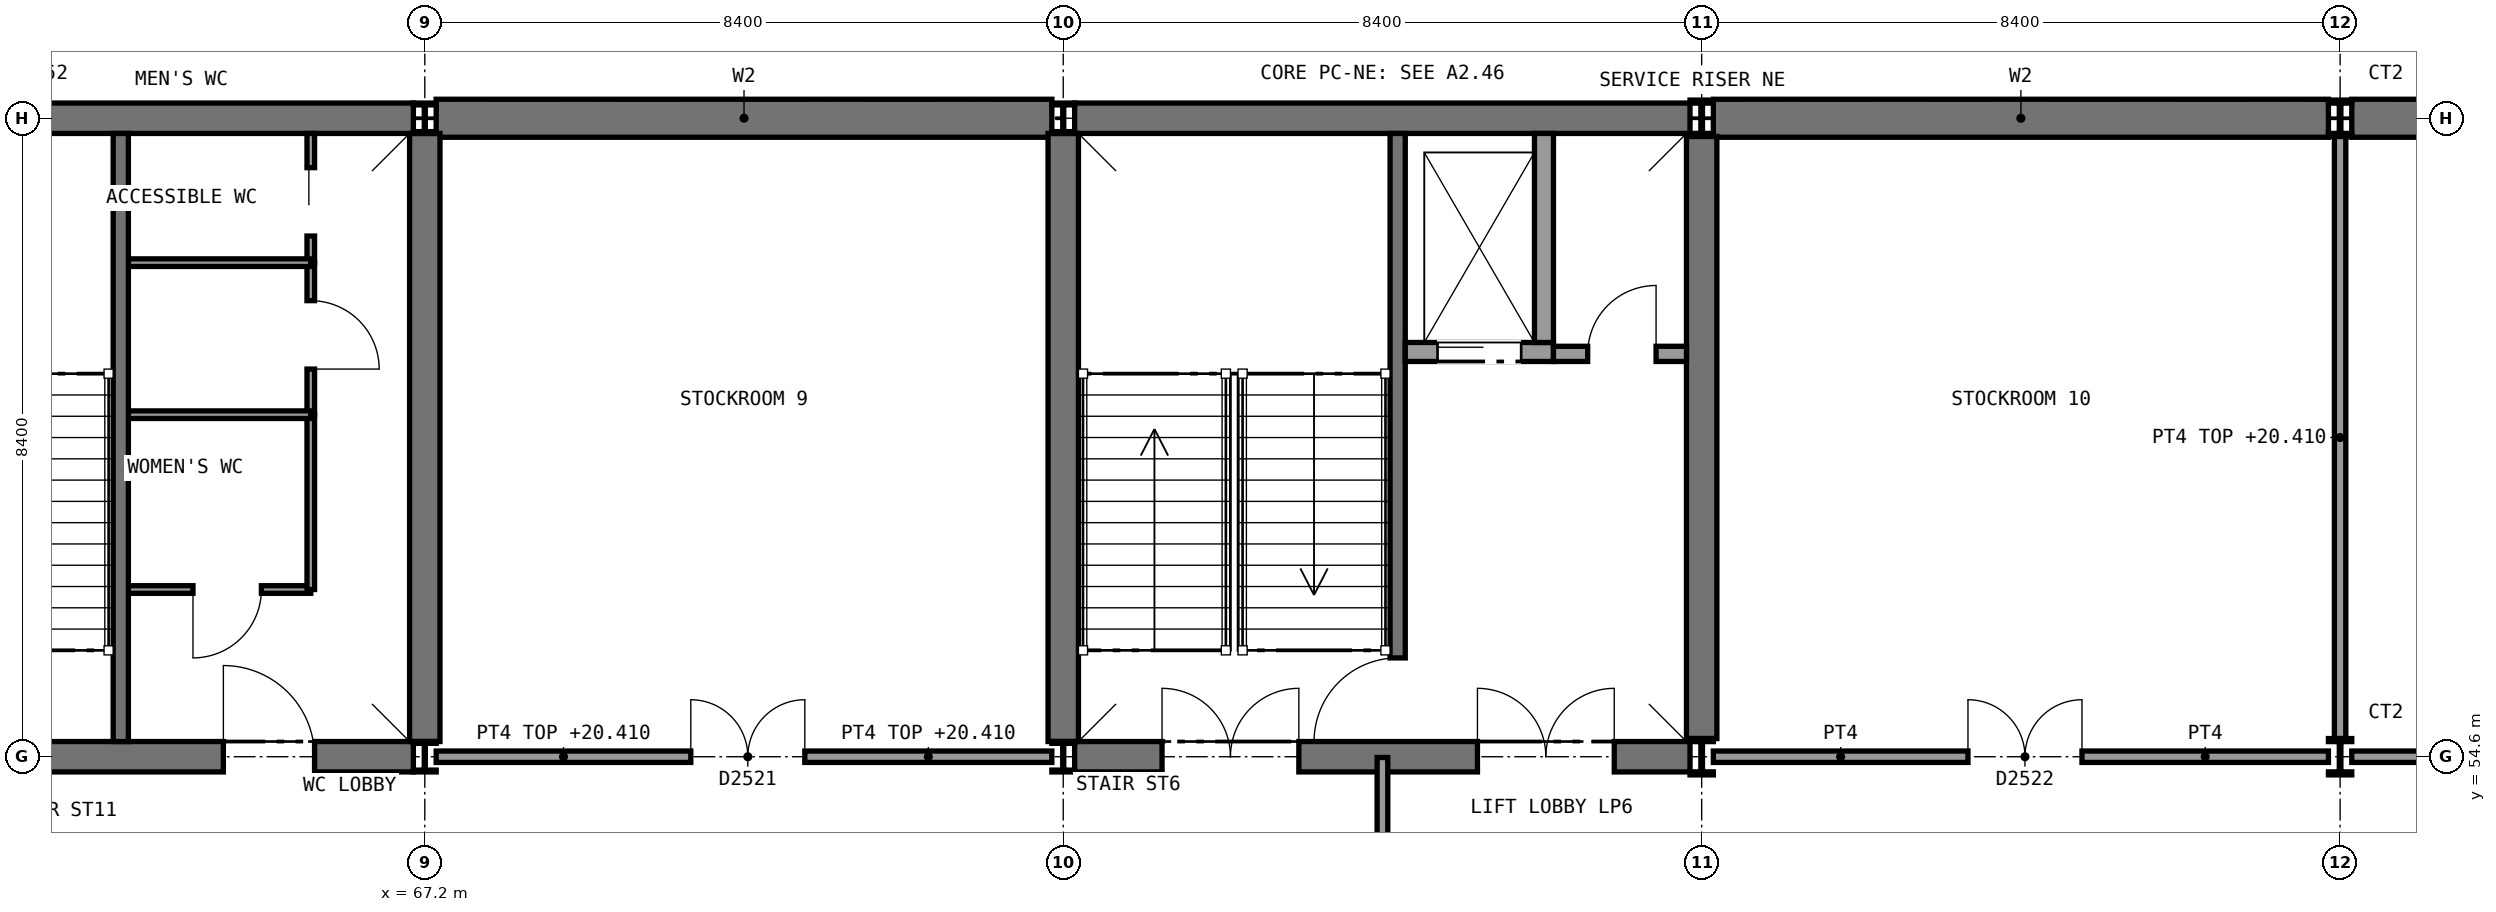
"""IFC4 building model, lengths in metres.
Left out: names, types, materials, properties, quantities, classifications, styles, units other than length and angle.
Written with IfcOpenShell. Run it as: python <this file> out.ifc"""

import sys

from ifc_helpers import new_model, si_unit, direction, frame, frame_2d, origin, origin_2d, place, context, subcontext, project, spatial, rectangle, i_section, extrude, element, fill, save


model = new_model("IFC4")
c1 = context("Model", 3, precision=1e-05, world=origin(), true_north=direction((0.0, 1.0)))
c2 = subcontext(c1, "Body", "Model", "MODEL_VIEW")
j1 = project(units=[si_unit("LENGTHUNIT", "METRE"), si_unit("PLANEANGLEUNIT", "RADIAN")], contexts=[c1])
p1 = place(None, origin())
s1 = spatial("IfcSite", under=j1, at=p1, CompositionType="ELEMENT")
p2 = place(p1, origin())
s2 = spatial("IfcBuilding", under=s1, at=p2, CompositionType="ELEMENT")
p3 = place(p2, frame((0.0, 0.0, 16.2)))
s3 = spatial("IfcBuildingStorey", under=s2, at=p3, CompositionType="ELEMENT", Elevation=16.2)
p4 = place(p3, frame((67.35, 63.0, 0.0), z_axis=(0.0, 0.0, 1.0), x_axis=(1.0, 0.0, 0.0)))
e1 = element("IfcWall", 1, at=p4, inside=s3, PredefinedType="SHEAR", context=c2, shape_type="SweptSolid", body=[
    extrude(rectangle(XDim=8.1, YDim=0.5, at=frame_2d((4.05, 0.0))), origin(), (0.0, 0.0, 1.0), 4.65),
])
p5 = place(p3, frame((84.154, 63.0, 0.0), z_axis=(0.0, 0.0, 1.0), x_axis=(1.0, 0.0, 0.0)))
e2 = element("IfcWall", 2, at=p5, inside=s3, PredefinedType="SHEAR", context=c2, shape_type="SweptSolid", body=[
    extrude(rectangle(XDim=8.093, YDim=0.5, at=frame_2d((4.046, 0.0))), origin(), (0.0, 0.0, 1.0), 4.65),
])
p6 = place(p3, frame((92.553, 63.0, 0.0), z_axis=(0.0, 0.0, 1.0), x_axis=(1.0, 0.0, 0.0)))
e3 = element("IfcWall", 3, at=p6, inside=s3, PredefinedType="SHEAR", context=c2, shape_type="SweptSolid", body=[
    extrude(rectangle(XDim=8.093, YDim=0.5, at=frame_2d((4.046, 0.0))), origin(), (0.0, 0.0, 1.0), 4.65),
])
p7 = place(p3, frame((75.75, 63.0, 0.0), z_axis=(0.0, 0.0, 1.0), x_axis=(1.0, 0.0, 0.0)))
e4 = element("IfcWall", 4, at=p7, inside=s3, PredefinedType="SHEAR", context=c2, shape_type="SweptSolid", body=[
    extrude(rectangle(XDim=8.096, YDim=0.4, at=frame_2d((4.048, 0.0))), origin(), (0.0, 0.0, 1.0), 4.65),
])
p8 = place(p3, frame((75.75, 54.6, 0.0), z_axis=(0.0, 0.0, 1.0), x_axis=(1.0, 0.0, 0.0)))
e5 = element("IfcWall", 5, at=p8, inside=s3, PredefinedType="SHEAR", context=c2, shape_type="SweptSolid", body=[
    extrude(rectangle(XDim=8.096, YDim=0.4, at=frame_2d((4.048, 0.0))), origin(), (0.0, 0.0, 1.0), 4.65),
])
p9 = place(p8, frame((1.15, 0.0, 0.0)))
e6 = element("IfcOpeningElement", 6, at=p9, cuts=e5, PredefinedType="OPENING", context=c2, shape_type="SweptSolid", body=[
    extrude(rectangle(XDim=1.8, YDim=2.1, at=frame_2d((0.9, 1.05))), frame((0.0, 0.21, 0.0), z_axis=(0.0, -1.0, 0.0), x_axis=(1.0, 0.0, 0.0)), (0.0, 0.0, 1.0), 0.42),
])
p10 = place(p8, frame((5.3, 0.0, 0.0)))
e7 = element("IfcOpeningElement", 7, at=p10, cuts=e5, PredefinedType="OPENING", context=c2, shape_type="SweptSolid", body=[
    extrude(rectangle(XDim=1.8, YDim=2.1, at=frame_2d((0.9, 1.05))), frame((0.0, 0.21, 0.0), z_axis=(0.0, -1.0, 0.0), x_axis=(1.0, 0.0, 0.0)), (0.0, 0.0, 1.0), 0.42),
])
p11 = place(p3, frame((75.6, 54.8, 0.0), z_axis=(0.0, 0.0, 1.0), x_axis=(0.0, 1.0, 0.0)))
e8 = element("IfcWall", 8, at=p11, inside=s3, PredefinedType="SHEAR", context=c2, shape_type="SweptSolid", body=[
    extrude(rectangle(XDim=8.0, YDim=0.4, at=frame_2d((4.0, 0.0))), origin(), (0.0, 0.0, 1.0), 4.65),
])
p12 = place(p3, frame((84.0, 54.839, 0.0), z_axis=(0.0, 0.0, 1.0), x_axis=(0.0, 1.0, 0.0)))
e9 = element("IfcWall", 9, at=p12, inside=s3, PredefinedType="SHEAR", context=c2, shape_type="SweptSolid", body=[
    extrude(rectangle(XDim=7.922, YDim=0.4, at=frame_2d((3.961, 0.0))), origin(), (0.0, 0.0, 1.0), 4.65),
])
p13 = place(p3, frame((58.95, 63.0, 0.0), z_axis=(0.0, 0.0, 1.0), x_axis=(1.0, 0.0, 0.0)))
e10 = element("IfcWall", 10, at=p13, inside=s3, PredefinedType="SHEAR", context=c2, shape_type="SweptSolid", body=[
    extrude(rectangle(XDim=8.1, YDim=0.4, at=frame_2d((4.05, 0.0))), origin(), (0.0, 0.0, 1.0), 4.65),
])
p14 = place(p3, frame((58.95, 54.6, 0.0), z_axis=(0.0, 0.0, 1.0), x_axis=(1.0, 0.0, 0.0)))
e11 = element("IfcWall", 11, at=p14, inside=s3, PredefinedType="SHEAR", context=c2, shape_type="SweptSolid", body=[
    extrude(rectangle(XDim=8.1, YDim=0.4, at=frame_2d((4.05, 0.0))), origin(), (0.0, 0.0, 1.0), 4.65),
])
p15 = place(p14, frame((1.15, 0.0, 0.0)))
e12 = element("IfcOpeningElement", 12, at=p15, cuts=e11, PredefinedType="OPENING", context=c2, shape_type="SweptSolid", body=[
    extrude(rectangle(XDim=1.8, YDim=2.1, at=frame_2d((0.9, 1.05))), frame((0.0, 0.21, 0.0), z_axis=(0.0, -1.0, 0.0), x_axis=(1.0, 0.0, 0.0)), (0.0, 0.0, 1.0), 0.42),
])
p16 = place(p14, frame((5.6, 0.0, 0.0)))
e13 = element("IfcOpeningElement", 13, at=p16, cuts=e11, PredefinedType="OPENING", context=c2, shape_type="SweptSolid", body=[
    extrude(rectangle(XDim=1.2, YDim=2.1, at=frame_2d((0.6, 1.05))), frame((0.0, 0.21, 0.0), z_axis=(0.0, -1.0, 0.0), x_axis=(1.0, 0.0, 0.0)), (0.0, 0.0, 1.0), 0.42),
])
p17 = place(p3, frame((67.2, 54.8, 0.0), z_axis=(0.0, 0.0, 1.0), x_axis=(0.0, 1.0, 0.0)))
e14 = element("IfcWall", 14, at=p17, inside=s3, PredefinedType="SHEAR", context=c2, shape_type="SweptSolid", body=[
    extrude(rectangle(XDim=8.0, YDim=0.4, at=frame_2d((4.0, 0.0))), origin(), (0.0, 0.0, 1.0), 4.65),
])
for number, where, z_axis, x_axis in (
    (15, (67.2, 54.6, 0.0), (0.0, 0.0, 1.0), (1.0, 0.0, 0.0)),
    (16, (67.2, 63.0, 0.0), (0.0, 0.0, 1.0), (1.0, 0.0, 0.0)),
    (17, (75.6, 54.6, 0.0), (0.0, 0.0, 1.0), (1.0, 0.0, 0.0)),
    (18, (75.6, 63.0, 0.0), (0.0, 0.0, 1.0), (1.0, 0.0, 0.0)),
):
    element("IfcColumn", number, at=place(p3, frame(where, z_axis=z_axis, x_axis=x_axis)), inside=s3, PredefinedType="COLUMN", context=c2, shape_type="SweptSolid", body=[
        extrude(i_section(OverallWidth=0.3, OverallDepth=0.4, WebThickness=0.013, FlangeThickness=0.024, FilletRadius=0.027, at=origin_2d()), origin(), (0.0, 0.0, 1.0), 4.8),
    ])
for number, where, z_axis, x_axis in (
    (19, (84.0, 54.6, 0.0), (0.0, 0.0, 1.0), (1.0, 0.0, 0.0)),
    (20, (84.0, 63.0, 0.0), (0.0, 0.0, 1.0), (1.0, 0.0, 0.0)),
    (21, (92.4, 54.6, 0.0), (0.0, 0.0, 1.0), (1.0, 0.0, 0.0)),
    (22, (92.4, 63.0, 0.0), (0.0, 0.0, 1.0), (1.0, 0.0, 0.0)),
):
    element("IfcColumn", number, at=place(p3, frame(where, z_axis=z_axis, x_axis=x_axis)), inside=s3, PredefinedType="COLUMN", context=c2, shape_type="SweptSolid", body=[
        extrude(i_section(OverallWidth=0.307, OverallDepth=0.478, WebThickness=0.021, FlangeThickness=0.04, FilletRadius=0.027, at=origin_2d()), origin(), (0.0, 0.0, 1.0), 4.8),
    ])
p18 = place(p3, frame((63.3, 56.8, 0.0), z_axis=(0.0, 0.0, 1.0), x_axis=(1.0, 0.0, 0.0)))
e23 = element("IfcWall", 23, at=p18, inside=s3, PredefinedType="PARTITIONING", context=c2, shape_type="SweptSolid", body=[
    extrude(rectangle(XDim=2.4, YDim=0.1, at=frame_2d((1.2, 0.0))), origin(), (0.0, 0.0, 1.0), 4.58),
])
p19 = place(p18, frame((0.85, 0.0, 0.0)))
e24 = element("IfcOpeningElement", 24, at=p19, cuts=e23, PredefinedType="OPENING", context=c2, shape_type="SweptSolid", body=[
    extrude(rectangle(XDim=0.9, YDim=2.1, at=frame_2d((0.45, 1.05))), frame((0.0, 0.06, 0.0), z_axis=(0.0, -1.0, 0.0), x_axis=(1.0, 0.0, 0.0)), (0.0, 0.0, 1.0), 0.12),
])
p20 = place(p3, frame((65.7, 56.8, 0.0), z_axis=(0.0, 0.0, 1.0), x_axis=(0.0, 1.0, 0.0)))
e25 = element("IfcWall", 25, at=p20, inside=s3, PredefinedType="PARTITIONING", context=c2, shape_type="SweptSolid", body=[
    extrude(rectangle(XDim=2.3, YDim=0.1, at=frame_2d((1.15, 0.0))), origin(), (0.0, 0.0, 1.0), 4.58),
])
p21 = place(p3, frame((65.7, 59.1, 0.0), z_axis=(0.0, 0.0, 1.0), x_axis=(0.0, 1.0, 0.0)))
e26 = element("IfcWall", 26, at=p21, inside=s3, PredefinedType="PARTITIONING", context=c2, shape_type="SweptSolid", body=[
    extrude(rectangle(XDim=2.0, YDim=0.1, at=frame_2d((1.0, 0.0))), origin(), (0.0, 0.0, 1.0), 4.58),
])
p22 = place(p21, frame((0.6, 0.0, 0.0)))
e27 = element("IfcOpeningElement", 27, at=p22, cuts=e26, PredefinedType="OPENING", context=c2, shape_type="SweptSolid", body=[
    extrude(rectangle(XDim=0.9, YDim=2.1, at=frame_2d((0.45, 1.05))), frame((0.0, 0.06, 0.0), z_axis=(0.0, -1.0, 0.0), x_axis=(1.0, 0.0, 0.0)), (0.0, 0.0, 1.0), 0.12),
])
p23 = place(p3, frame((65.7, 61.1, 0.0), z_axis=(0.0, 0.0, 1.0), x_axis=(0.0, 1.0, 0.0)))
e28 = element("IfcWall", 28, at=p23, inside=s3, PredefinedType="PARTITIONING", context=c2, shape_type="SweptSolid", body=[
    extrude(rectangle(XDim=1.7, YDim=0.1, at=frame_2d((0.85, 0.0))), origin(), (0.0, 0.0, 1.0), 4.58),
])
p24 = place(p23, frame((0.35, 0.0, 0.0)))
e29 = element("IfcOpeningElement", 29, at=p24, cuts=e28, PredefinedType="OPENING", context=c2, shape_type="SweptSolid", body=[
    extrude(rectangle(XDim=0.9, YDim=2.1, at=frame_2d((0.45, 1.05))), frame((0.0, 0.06, 0.0), z_axis=(0.0, -1.0, 0.0), x_axis=(1.0, 0.0, 0.0)), (0.0, 0.0, 1.0), 0.12),
])
for number, where, z_axis, x_axis in (
    (30, (63.3, 59.1, 0.0), (0.0, 0.0, 1.0), (1.0, 0.0, 0.0)),
    (31, (63.3, 61.1, 0.0), (0.0, 0.0, 1.0), (1.0, 0.0, 0.0)),
):
    element("IfcWall", number, at=place(p3, frame(where, z_axis=z_axis, x_axis=x_axis)), inside=s3, PredefinedType="PARTITIONING", context=c2, shape_type="SweptSolid", body=[
        extrude(rectangle(XDim=2.4, YDim=0.1, at=frame_2d((1.2, 0.0))), origin(), (0.0, 0.0, 1.0), 4.58),
    ])
p25 = place(p3, frame((67.35, 54.6, 0.0), z_axis=(0.0, 0.0, 1.0), x_axis=(1.0, 0.0, 0.0)))
e32 = element("IfcWall", 32, at=p25, inside=s3, PredefinedType="SOLIDWALL", context=c2, shape_type="SweptSolid", body=[
    extrude(rectangle(XDim=8.1, YDim=0.15, at=frame_2d((4.05, 0.0))), origin(), (0.0, 0.0, 1.0), 4.21),
])
p26 = place(p25, frame((3.35, 0.0, 0.0)))
e33 = element("IfcOpeningElement", 33, at=p26, cuts=e32, PredefinedType="OPENING", context=c2, shape_type="SweptSolid", body=[
    extrude(rectangle(XDim=1.5, YDim=2.1, at=frame_2d((0.75, 1.05))), frame((0.0, 0.085, 0.0), z_axis=(0.0, -1.0, 0.0), x_axis=(1.0, 0.0, 0.0)), (0.0, 0.0, 1.0), 0.17),
])
p27 = place(p3, frame((92.4, 54.839, 0.0), z_axis=(0.0, 0.0, 1.0), x_axis=(0.0, 1.0, 0.0)))
e34 = element("IfcWall", 34, at=p27, inside=s3, PredefinedType="SOLIDWALL", context=c2, shape_type="SweptSolid", body=[
    extrude(rectangle(XDim=7.922, YDim=0.15, at=frame_2d((3.961, 0.0))), origin(), (0.0, 0.0, 1.0), 4.21),
])
p28 = place(p3, frame((84.154, 54.6, 0.0), z_axis=(0.0, 0.0, 1.0), x_axis=(1.0, 0.0, 0.0)))
e35 = element("IfcWall", 35, at=p28, inside=s3, PredefinedType="SOLIDWALL", context=c2, shape_type="SweptSolid", body=[
    extrude(rectangle(XDim=8.093, YDim=0.15, at=frame_2d((4.046, 0.0))), origin(), (0.0, 0.0, 1.0), 4.32),
])
p29 = place(p28, frame((3.35, 0.0, 0.0)))
e36 = element("IfcOpeningElement", 36, at=p29, cuts=e35, PredefinedType="OPENING", context=c2, shape_type="SweptSolid", body=[
    extrude(rectangle(XDim=1.5, YDim=2.1, at=frame_2d((0.75, 1.05))), frame((0.0, 0.085, 0.0), z_axis=(0.0, -1.0, 0.0), x_axis=(1.0, 0.0, 0.0)), (0.0, 0.0, 1.0), 0.17),
])
p30 = place(p3, frame((92.553, 54.6, 0.0), z_axis=(0.0, 0.0, 1.0), x_axis=(1.0, 0.0, 0.0)))
e37 = element("IfcWall", 37, at=p30, inside=s3, PredefinedType="SOLIDWALL", context=c2, shape_type="SweptSolid", body=[
    extrude(rectangle(XDim=8.093, YDim=0.15, at=frame_2d((4.046, 0.0))), origin(), (0.0, 0.0, 1.0), 4.32),
])
p31 = place(p30, frame((3.35, 0.0, 0.0)))
e38 = element("IfcOpeningElement", 38, at=p31, cuts=e37, PredefinedType="OPENING", context=c2, shape_type="SweptSolid", body=[
    extrude(rectangle(XDim=1.5, YDim=2.1, at=frame_2d((0.75, 1.05))), frame((0.0, 0.085, 0.0), z_axis=(0.0, -1.0, 0.0), x_axis=(1.0, 0.0, 0.0)), (0.0, 0.0, 1.0), 0.17),
])
p32 = place(p3, frame((79.8, 47.2, 0.0), z_axis=(0.0, 0.0, 1.0), x_axis=(0.0, 1.0, 0.0)))
e39 = element("IfcWall", 39, at=p32, inside=s3, PredefinedType="PARTITIONING", context=c2, shape_type="SweptSolid", body=[
    extrude(rectangle(XDim=7.39, YDim=0.14, at=frame_2d((3.695, 0.0))), origin(), (0.0, 0.0, 1.0), 4.65),
])
p33 = place(p3, frame((80.0, 62.8, 0.0), z_axis=(0.0, 0.0, 1.0), x_axis=(0.0, -1.0, 0.0)))
e40 = element("IfcWall", 40, at=p33, inside=s3, PredefinedType="SHEAR", context=c2, shape_type="SweptSolid", body=[
    extrude(rectangle(XDim=8.0, YDim=0.2, at=frame_2d((4.0, 0.0))), origin(), (0.0, 0.0, 1.0), 4.65),
])
p34 = place(p33, frame((6.9, 0.0, 0.0)))
e41 = element("IfcOpeningElement", 41, at=p34, cuts=e40, PredefinedType="OPENING", context=c2, shape_type="SweptSolid", body=[
    extrude(rectangle(XDim=1.11, YDim=2.1, at=frame_2d((0.555, 1.05))), frame((0.0, 0.11, 0.0), z_axis=(0.0, -1.0, 0.0), x_axis=(1.0, 0.0, 0.0)), (0.0, 0.0, 1.0), 0.22),
])
p35 = place(p3, frame((80.1, 59.925, 0.0), z_axis=(0.0, 0.0, 1.0), x_axis=(1.0, 0.0, 0.0)))
e42 = element("IfcWall", 42, at=p35, inside=s3, PredefinedType="SOLIDWALL", context=c2, shape_type="SweptSolid", body=[
    extrude(rectangle(XDim=1.95, YDim=0.25, at=frame_2d((0.975, 0.0))), origin(), (0.0, 0.0, 1.0), 4.8),
])
p36 = place(p35, frame((0.425, 0.0, 0.0)))
e43 = element("IfcOpeningElement", 43, at=p36, cuts=e42, PredefinedType="OPENING", context=c2, shape_type="SweptSolid", body=[
    extrude(rectangle(XDim=1.1, YDim=2.1, at=frame_2d((0.55, 1.05))), frame((0.0, 0.135, 0.0), z_axis=(0.0, -1.0, 0.0), x_axis=(1.0, 0.0, 0.0)), (0.0, 0.0, 1.0), 0.27),
])
p37 = place(p3, frame((81.925, 62.8, 0.0), z_axis=(0.0, 0.0, 1.0), x_axis=(0.0, -1.0, 0.0)))
e44 = element("IfcWall", 44, at=p37, inside=s3, PredefinedType="SOLIDWALL", context=c2, shape_type="SweptSolid", body=[
    extrude(rectangle(XDim=2.75, YDim=0.25, at=frame_2d((1.375, 0.0))), origin(), (0.0, 0.0, 1.0), 4.8),
])
p38 = place(p3, frame((82.05, 59.9, 0.0), z_axis=(0.0, 0.0, 1.0), x_axis=(1.0, 0.0, 0.0)))
e45 = element("IfcWall", 45, at=p38, inside=s3, PredefinedType="PARTITIONING", context=c2, shape_type="SweptSolid", body=[
    extrude(rectangle(XDim=1.75, YDim=0.2, at=frame_2d((0.875, 0.0))), origin(), (0.0, 0.0, 1.0), 4.65),
])
p39 = place(p38, frame((0.45, 0.0, 0.0)))
e46 = element("IfcOpeningElement", 46, at=p39, cuts=e45, PredefinedType="OPENING", context=c2, shape_type="SweptSolid", body=[
    extrude(rectangle(XDim=0.9, YDim=2.1, at=frame_2d((0.45, 1.05))), frame((0.0, 0.11, 0.0), z_axis=(0.0, -1.0, 0.0), x_axis=(1.0, 0.0, 0.0)), (0.0, 0.0, 1.0), 0.22),
])
p40 = place(p3, frame((63.2, 62.8, 0.0), z_axis=(0.0, 0.0, 1.0), x_axis=(0.0, -1.0, 0.0)))
e47 = element("IfcWall", 47, at=p40, inside=s3, PredefinedType="SHEAR", context=c2, shape_type="SweptSolid", body=[
    extrude(rectangle(XDim=8.0, YDim=0.2, at=frame_2d((4.0, 0.0))), origin(), (0.0, 0.0, 1.0), 4.65),
])
p41 = place(p19, frame((0.9, 0.0, 0.0), z_axis=(0.0, 0.0, 1.0), x_axis=(-1.0, 0.0, 0.0)))
e48 = element("IfcDoor", 48, at=p41, inside=s3, OperationType="SINGLE_SWING_RIGHT", PredefinedType="DOOR", context=c2, shape_type="SweptSolid", body=[
    extrude(rectangle(XDim=0.9, YDim=2.1, at=frame_2d((0.45, 1.05))), frame((0.0, 0.025, 0.0), z_axis=(0.0, -1.0, 0.0), x_axis=(1.0, 0.0, 0.0)), (0.0, 0.0, 1.0), 0.05),
])
fill(e24, e48)
p42 = place(p22, frame((0.9, 0.0, 0.0), z_axis=(0.0, 0.0, 1.0), x_axis=(-1.0, 0.0, 0.0)))
e49 = element("IfcDoor", 49, at=p42, inside=s3, OperationType="SINGLE_SWING_RIGHT", PredefinedType="DOOR", context=c2, shape_type="SweptSolid", body=[
    extrude(rectangle(XDim=0.9, YDim=2.1, at=frame_2d((0.45, 1.05))), frame((0.0, 0.025, 0.0), z_axis=(0.0, -1.0, 0.0), x_axis=(1.0, 0.0, 0.0)), (0.0, 0.0, 1.0), 0.05),
])
fill(e27, e49)
p43 = place(p24, origin())
e50 = element("IfcDoor", 50, at=p43, inside=s3, OperationType="SLIDING_TO_RIGHT", PredefinedType="DOOR", context=c2, shape_type="SweptSolid", body=[
    extrude(rectangle(XDim=0.9, YDim=2.1, at=frame_2d((0.45, 1.05))), frame((0.0, 0.025, 0.0), z_axis=(0.0, -1.0, 0.0), x_axis=(1.0, 0.0, 0.0)), (0.0, 0.0, 1.0), 0.05),
])
fill(e29, e50)
p44 = place(p26, origin())
e51 = element("IfcDoor", 51, at=p44, inside=s3, OperationType="DOUBLE_DOOR_SINGLE_SWING", PredefinedType="DOOR", context=c2, shape_type="SweptSolid", body=[
    extrude(rectangle(XDim=1.5, YDim=2.1, at=frame_2d((0.75, 1.05))), frame((0.0, 0.025, 0.0), z_axis=(0.0, -1.0, 0.0), x_axis=(1.0, 0.0, 0.0)), (0.0, 0.0, 1.0), 0.05),
])
fill(e33, e51)
p45 = place(p29, origin())
e52 = element("IfcDoor", 52, at=p45, inside=s3, OperationType="DOUBLE_DOOR_SINGLE_SWING", PredefinedType="DOOR", context=c2, shape_type="SweptSolid", body=[
    extrude(rectangle(XDim=1.5, YDim=2.1, at=frame_2d((0.75, 1.05))), frame((0.0, 0.025, 0.0), z_axis=(0.0, -1.0, 0.0), x_axis=(1.0, 0.0, 0.0)), (0.0, 0.0, 1.0), 0.05),
])
fill(e36, e52)
p46 = place(p34, frame((1.1, 0.0, 0.0), z_axis=(0.0, 0.0, 1.0), x_axis=(-1.0, 0.0, 0.0)))
e53 = element("IfcDoor", 53, at=p46, inside=s3, OperationType="SINGLE_SWING_LEFT", PredefinedType="DOOR", context=c2, shape_type="SweptSolid", body=[
    extrude(rectangle(XDim=1.1, YDim=2.1, at=frame_2d((0.55, 1.05))), frame((0.0, 0.025, 0.0), z_axis=(0.0, -1.0, 0.0), x_axis=(1.0, 0.0, 0.0)), (0.0, 0.0, 1.0), 0.05),
])
fill(e41, e53)
p47 = place(p36, frame((1.1, 0.0, 0.0), z_axis=(0.0, 0.0, 1.0), x_axis=(-1.0, 0.0, 0.0)))
e54 = element("IfcDoor", 54, at=p47, inside=s3, OperationType="SLIDING_TO_RIGHT", PredefinedType="DOOR", context=c2, shape_type="SweptSolid", body=[
    extrude(rectangle(XDim=1.1, YDim=2.1, at=frame_2d((0.55, 1.05))), frame((0.0, 0.025, 0.0), z_axis=(0.0, -1.0, 0.0), x_axis=(1.0, 0.0, 0.0)), (0.0, 0.0, 1.0), 0.05),
])
fill(e43, e54)
p48 = place(p39, origin())
e55 = element("IfcDoor", 55, at=p48, inside=s3, OperationType="SINGLE_SWING_RIGHT", PredefinedType="DOOR", context=c2, shape_type="SweptSolid", body=[
    extrude(rectangle(XDim=0.9, YDim=2.1, at=frame_2d((0.45, 1.05))), frame((0.0, 0.025, 0.0), z_axis=(0.0, -1.0, 0.0), x_axis=(1.0, 0.0, 0.0)), (0.0, 0.0, 1.0), 0.05),
])
fill(e46, e55)
p49 = place(p9, origin())
e56 = element("IfcDoor", 56, at=p49, inside=s3, OperationType="DOUBLE_DOOR_SINGLE_SWING", PredefinedType="DOOR", context=c2, shape_type="SweptSolid", body=[
    extrude(rectangle(XDim=1.8, YDim=2.1, at=frame_2d((0.9, 1.05))), frame((0.0, 0.025, 0.0), z_axis=(0.0, -1.0, 0.0), x_axis=(1.0, 0.0, 0.0)), (0.0, 0.0, 1.0), 0.05),
])
fill(e6, e56)
p50 = place(p10, origin())
e57 = element("IfcDoor", 57, at=p50, inside=s3, OperationType="DOUBLE_DOOR_SINGLE_SWING", PredefinedType="DOOR", context=c2, shape_type="SweptSolid", body=[
    extrude(rectangle(XDim=1.8, YDim=2.1, at=frame_2d((0.9, 1.05))), frame((0.0, 0.025, 0.0), z_axis=(0.0, -1.0, 0.0), x_axis=(1.0, 0.0, 0.0)), (0.0, 0.0, 1.0), 0.05),
])
fill(e7, e57)
p51 = place(p16, origin())
e58 = element("IfcDoor", 58, at=p51, inside=s3, OperationType="SINGLE_SWING_LEFT", PredefinedType="DOOR", context=c2, shape_type="SweptSolid", body=[
    extrude(rectangle(XDim=1.2, YDim=2.1, at=frame_2d((0.6, 1.05))), frame((0.0, 0.025, 0.0), z_axis=(0.0, -1.0, 0.0), x_axis=(1.0, 0.0, 0.0)), (0.0, 0.0, 1.0), 0.05),
])
fill(e13, e58)
save(model, sys.argv[1])
